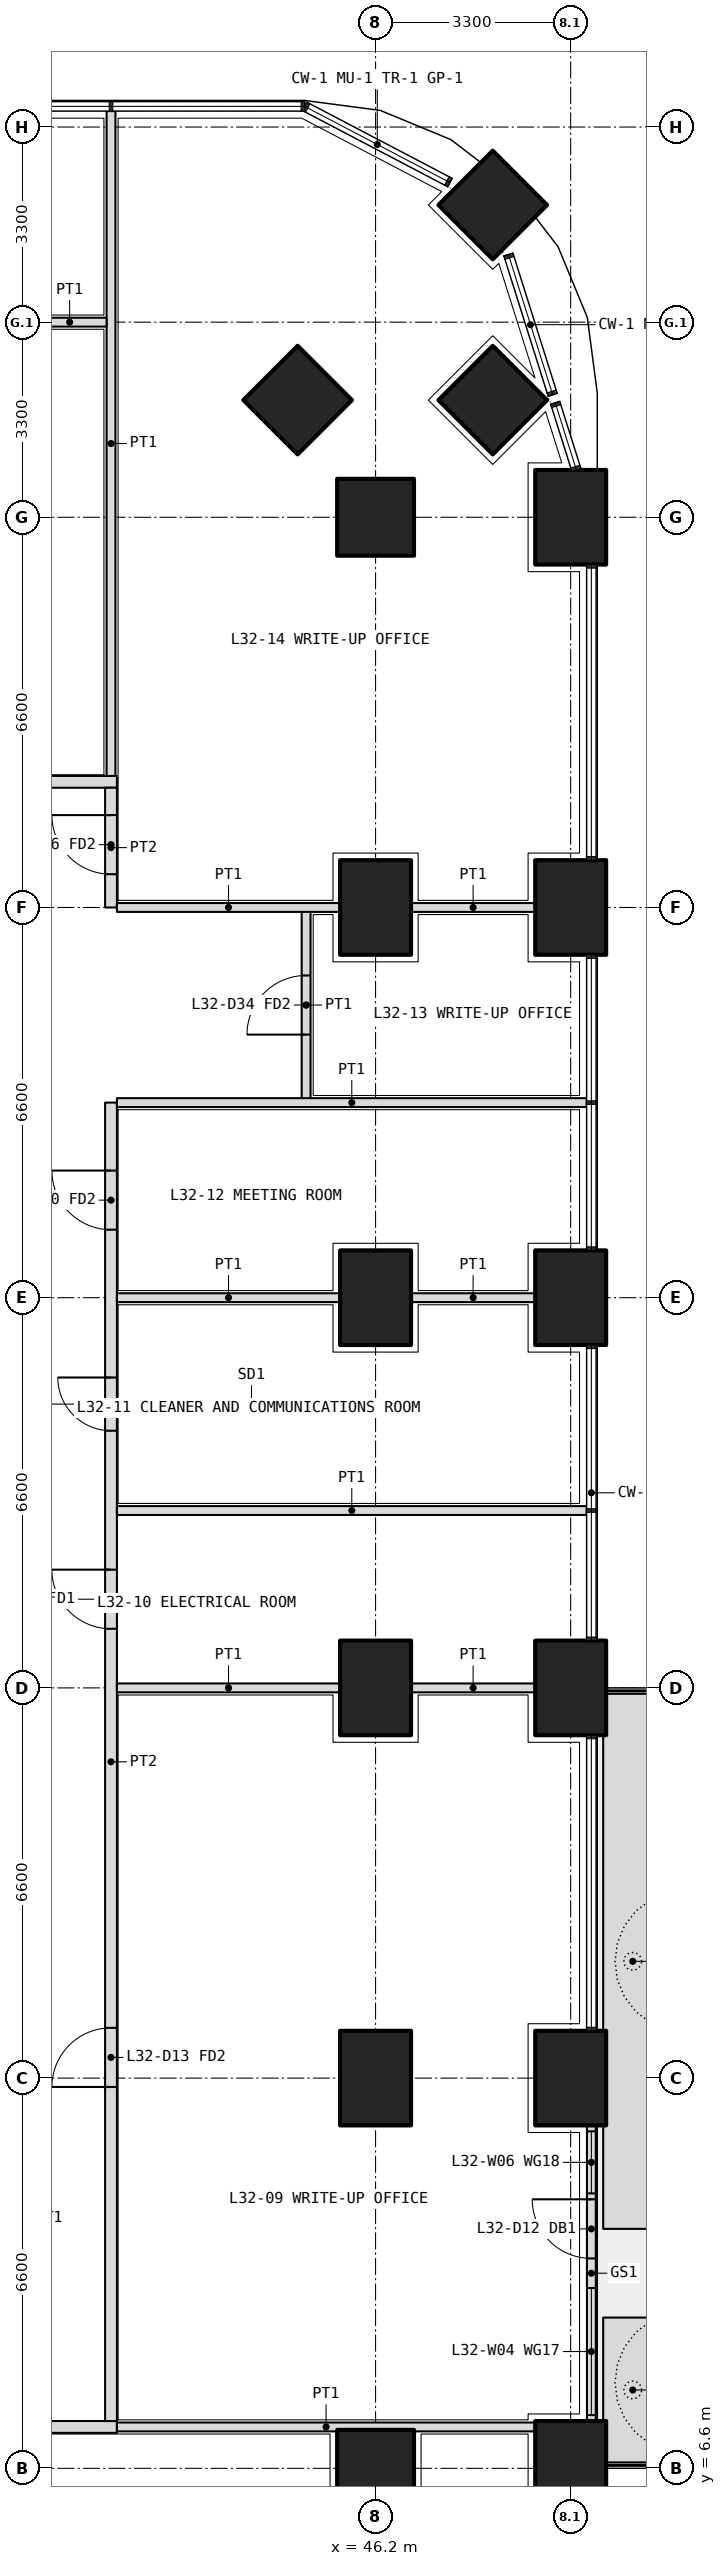
"""IFC4 building model, lengths in metres.
Left out: names, types, materials, properties, quantities, classifications, styles, units other than length and angle.
Written with IfcOpenShell. Run it as: python <this file> out.ifc"""

import sys

from ifc_helpers import new_model, si_unit, direction, frame, frame_2d, origin, origin_2d, place, context, subcontext, project, spatial, polyline, rectangle, outline, extrude, element, fill, save


model = new_model("IFC4")
c1 = context("Model", 3, precision=1e-05, world=origin(), true_north=direction((0.0, 1.0)))
c2 = subcontext(c1, "Body", "Model", "MODEL_VIEW")
j1 = project(units=[si_unit("LENGTHUNIT", "METRE"), si_unit("PLANEANGLEUNIT", "RADIAN")], contexts=[c1])
p1 = place(None, origin())
s1 = spatial("IfcSite", under=j1, at=p1, CompositionType="ELEMENT")
p2 = place(p1, origin())
s2 = spatial("IfcBuilding", under=s1, at=p2, CompositionType="ELEMENT")
p3 = place(p2, frame((0.0, 0.0, 141.0)))
s3 = spatial("IfcBuildingStorey", under=s2, at=p3, CompositionType="ELEMENT", Elevation=141.0)
p4 = place(p3, frame((48.182, 44.882, 0.0), z_axis=(0.0, 0.0, 1.0), x_axis=(0.707106781187, 0.707106781187, 0.0)))
e1 = element("IfcColumn", 1, at=p4, inside=s3, PredefinedType="COLUMN", context=c2, shape_type="SweptSolid", body=[
    extrude(rectangle(XDim=1.3, YDim=1.3, at=origin_2d()), origin(), (0.0, 0.0, 1.0), 4.2),
])
for number, where, z_axis, x_axis in (
    (2, (49.5, 6.6, 0.0), (0.0, 0.0, 1.0), (0.0, 1.0, 0.0)),
    (3, (49.5, 13.2, 0.0), (0.0, 0.0, 1.0), (0.0, 1.0, 0.0)),
    (4, (49.5, 19.8, 0.0), (0.0, 0.0, 1.0), (0.0, 1.0, 0.0)),
    (5, (49.5, 26.4, 0.0), (0.0, 0.0, 1.0), (0.0, 1.0, 0.0)),
    (6, (49.5, 33.0, 0.0), (0.0, 0.0, 1.0), (0.0, 1.0, 0.0)),
    (7, (49.5, 39.6, 0.0), (0.0, 0.0, 1.0), (0.0, 1.0, 0.0)),
):
    element("IfcColumn", number, at=place(p3, frame(where, z_axis=z_axis, x_axis=x_axis)), inside=s3, PredefinedType="COLUMN", context=c2, shape_type="SweptSolid", body=[
        extrude(rectangle(XDim=1.6, YDim=1.2, at=origin_2d()), origin(), (0.0, 0.0, 1.0), 4.2),
    ])
for number, where, z_axis, x_axis in (
    (8, (46.2, 6.6, 0.0), (0.0, 0.0, 1.0), (1.0, 0.0, 0.0)),
    (9, (46.2, 39.6, 0.0), (0.0, 0.0, 1.0), (1.0, 0.0, 0.0)),
    (10, (48.182, 41.582, 0.0), (0.0, 0.0, 1.0), (0.707, 0.707, 0.0)),
    (11, (44.882, 41.582, 0.0), (0.0, 0.0, 1.0), (0.707, 0.707, 0.0)),
):
    element("IfcColumn", number, at=place(p3, frame(where, z_axis=z_axis, x_axis=x_axis)), inside=s3, PredefinedType="COLUMN", context=c2, shape_type="SweptSolid", body=[
        extrude(rectangle(XDim=1.3, YDim=1.3, at=origin_2d()), origin(), (0.0, 0.0, 1.0), 4.2),
    ])
for number, where, z_axis, x_axis in (
    (12, (46.2, 13.2, 0.0), (0.0, 0.0, 1.0), (0.0, 1.0, 0.0)),
    (13, (46.2, 19.8, 0.0), (0.0, 0.0, 1.0), (0.0, 1.0, 0.0)),
    (14, (46.2, 26.4, 0.0), (0.0, 0.0, 1.0), (0.0, 1.0, 0.0)),
    (15, (46.2, 33.0, 0.0), (0.0, 0.0, 1.0), (0.0, 1.0, 0.0)),
):
    element("IfcColumn", number, at=place(p3, frame(where, z_axis=z_axis, x_axis=x_axis)), inside=s3, PredefinedType="COLUMN", context=c2, shape_type="SweptSolid", body=[
        extrude(rectangle(XDim=1.6, YDim=1.2, at=origin_2d()), origin(), (0.0, 0.0, 1.0), 4.2),
    ])
p5 = place(p3, origin())
e16 = element("IfcWall", 16, at=p5, inside=s3, PredefinedType="USERDEFINED", context=c2, shape_type="SweptSolid", body=[
    extrude(outline(polyline([(50.05, 6.7), (51.05, 6.7), (51.05, 9.15), (50.05, 9.15), (50.05, 6.7)]), holes=[polyline([(50.2, 6.85), (50.9, 6.85), (50.9, 9.0), (50.2, 9.0), (50.2, 6.85)])]), origin(), (0.0, 0.0, 1.0), 1.05),
])
p6 = place(p3, origin())
e17 = element("IfcWall", 17, at=p6, inside=s3, PredefinedType="USERDEFINED", context=c2, shape_type="SweptSolid", body=[
    extrude(outline(polyline([(50.05, 10.65), (51.05, 10.65), (51.05, 19.7), (50.05, 19.7), (50.05, 10.65)]), holes=[polyline([(50.2, 10.8), (50.9, 10.8), (50.9, 19.55), (50.2, 19.55), (50.2, 10.8)])]), origin(), (0.0, 0.0, 1.0), 1.05),
])
p7 = place(p3, frame((49.85, 7.4, 0.0), z_axis=(0.0, 0.0, 1.0), x_axis=(0.0, 1.0, 0.0)))
e18 = element("IfcWall", 18, at=p7, inside=s3, PredefinedType="SOLIDWALL", context=c2, shape_type="SweptSolid", body=[
    extrude(rectangle(XDim=5.0, YDim=0.15, at=frame_2d((2.5, 0.0))), origin(), (0.0, 0.0, 1.0), 2.6),
])
p8 = place(p7, frame((2.75, 0.0, 0.0)))
e19 = element("IfcOpeningElement", 19, at=p8, cuts=e18, PredefinedType="OPENING", context=c2, shape_type="SweptSolid", body=[
    extrude(rectangle(XDim=1.0, YDim=2.4, at=frame_2d((0.5, 1.2))), frame((0.0, 0.085, 0.0), z_axis=(0.0, -1.0, 0.0), x_axis=(1.0, 0.0, 0.0)), (0.0, 0.0, 1.0), 0.17),
])
p9 = place(p7, frame((0.1, 0.0, 0.1)))
e20 = element("IfcOpeningElement", 20, at=p9, cuts=e18, PredefinedType="OPENING", context=c2, shape_type="SweptSolid", body=[
    extrude(rectangle(XDim=2.15, YDim=2.2, at=frame_2d((1.075, 1.1))), frame((0.0, 0.085, 0.0), z_axis=(0.0, -1.0, 0.0), x_axis=(1.0, 0.0, 0.0)), (0.0, 0.0, 1.0), 0.17),
])
p10 = place(p7, frame((3.85, 0.0, 0.1)))
e21 = element("IfcOpeningElement", 21, at=p10, cuts=e18, PredefinedType="OPENING", context=c2, shape_type="SweptSolid", body=[
    extrude(rectangle(XDim=1.05, YDim=2.2, at=frame_2d((0.525, 1.1))), frame((0.0, 0.085, 0.0), z_axis=(0.0, -1.0, 0.0), x_axis=(1.0, 0.0, 0.0)), (0.0, 0.0, 1.0), 0.17),
])
p11 = place(p3, frame((10.975, 7.3, 0.0), z_axis=(0.0, 0.0, 1.0), x_axis=(1.0, 0.0, 0.0)))
e22 = element("IfcWall", 22, at=p11, inside=s3, PredefinedType="PARTITIONING", context=c2, shape_type="SweptSolid", body=[
    extrude(rectangle(XDim=30.85, YDim=0.2, at=frame_2d((15.425, 0.0))), origin(), (0.0, 0.0, 1.0), 2.85),
])
p12 = place(p11, frame((3.962, 0.0, 0.0)))
e23 = element("IfcOpeningElement", 23, at=p12, cuts=e22, PredefinedType="OPENING", context=c2, shape_type="SweptSolid", body=[
    extrude(rectangle(XDim=1.0, YDim=2.1, at=frame_2d((0.5, 1.05))), frame((0.0, 0.11, 0.0), z_axis=(0.0, -1.0, 0.0), x_axis=(1.0, 0.0, 0.0)), (0.0, 0.0, 1.0), 0.22),
])
p13 = place(p11, frame((13.275, 0.0, 0.0)))
e24 = element("IfcOpeningElement", 24, at=p13, cuts=e22, PredefinedType="OPENING", context=c2, shape_type="SweptSolid", body=[
    extrude(rectangle(XDim=1.0, YDim=2.1, at=frame_2d((0.5, 1.05))), frame((0.0, 0.11, 0.0), z_axis=(0.0, -1.0, 0.0), x_axis=(1.0, 0.0, 0.0)), (0.0, 0.0, 1.0), 0.22),
])
p14 = place(p11, frame((21.525, 0.0, 0.0)))
e25 = element("IfcOpeningElement", 25, at=p14, cuts=e22, PredefinedType="OPENING", context=c2, shape_type="SweptSolid", body=[
    extrude(rectangle(XDim=1.0, YDim=2.1, at=frame_2d((0.5, 1.05))), frame((0.0, 0.11, 0.0), z_axis=(0.0, -1.0, 0.0), x_axis=(1.0, 0.0, 0.0)), (0.0, 0.0, 1.0), 0.22),
])
p15 = place(p11, frame((27.438, 0.0, 0.0)))
e26 = element("IfcOpeningElement", 26, at=p15, cuts=e22, PredefinedType="OPENING", context=c2, shape_type="SweptSolid", body=[
    extrude(rectangle(XDim=1.2, YDim=2.1, at=frame_2d((0.6, 1.05))), frame((0.0, 0.11, 0.0), z_axis=(0.0, -1.0, 0.0), x_axis=(1.0, 0.0, 0.0)), (0.0, 0.0, 1.0), 0.22),
])
p16 = place(p3, frame((10.975, 35.125, 0.0), z_axis=(0.0, 0.0, 1.0), x_axis=(1.0, 0.0, 0.0)))
e27 = element("IfcWall", 27, at=p16, inside=s3, PredefinedType="PARTITIONING", context=c2, shape_type="SweptSolid", body=[
    extrude(rectangle(XDim=30.85, YDim=0.2, at=frame_2d((15.425, 0.0))), origin(), (0.0, 0.0, 1.0), 2.85),
])
p17 = place(p16, frame((2.312, 0.0, 0.0)))
e28 = element("IfcOpeningElement", 28, at=p17, cuts=e27, PredefinedType="OPENING", context=c2, shape_type="SweptSolid", body=[
    extrude(rectangle(XDim=1.0, YDim=2.1, at=frame_2d((0.5, 1.05))), frame((0.0, 0.11, 0.0), z_axis=(0.0, -1.0, 0.0), x_axis=(1.0, 0.0, 0.0)), (0.0, 0.0, 1.0), 0.22),
])
p18 = place(p16, frame((8.325, 0.0, 0.0)))
e29 = element("IfcOpeningElement", 29, at=p18, cuts=e27, PredefinedType="OPENING", context=c2, shape_type="SweptSolid", body=[
    extrude(rectangle(XDim=1.0, YDim=2.1, at=frame_2d((0.5, 1.05))), frame((0.0, 0.11, 0.0), z_axis=(0.0, -1.0, 0.0), x_axis=(1.0, 0.0, 0.0)), (0.0, 0.0, 1.0), 0.22),
])
p19 = place(p16, frame((13.725, 0.0, 0.0)))
e30 = element("IfcOpeningElement", 30, at=p19, cuts=e27, PredefinedType="OPENING", context=c2, shape_type="SweptSolid", body=[
    extrude(rectangle(XDim=1.0, YDim=2.1, at=frame_2d((0.5, 1.05))), frame((0.0, 0.11, 0.0), z_axis=(0.0, -1.0, 0.0), x_axis=(1.0, 0.0, 0.0)), (0.0, 0.0, 1.0), 0.22),
])
p20 = place(p16, frame((17.025, 0.0, 0.0)))
e31 = element("IfcOpeningElement", 31, at=p20, cuts=e27, PredefinedType="OPENING", context=c2, shape_type="SweptSolid", body=[
    extrude(rectangle(XDim=1.0, YDim=2.1, at=frame_2d((0.5, 1.05))), frame((0.0, 0.11, 0.0), z_axis=(0.0, -1.0, 0.0), x_axis=(1.0, 0.0, 0.0)), (0.0, 0.0, 1.0), 0.22),
])
p21 = place(p16, frame((24.238, 0.0, 0.0)))
e32 = element("IfcOpeningElement", 32, at=p21, cuts=e27, PredefinedType="OPENING", context=c2, shape_type="SweptSolid", body=[
    extrude(rectangle(XDim=1.0, YDim=2.1, at=frame_2d((0.5, 1.05))), frame((0.0, 0.11, 0.0), z_axis=(0.0, -1.0, 0.0), x_axis=(1.0, 0.0, 0.0)), (0.0, 0.0, 1.0), 0.22),
])
p22 = place(p3, frame((41.725, 7.4, 0.0), z_axis=(0.0, 0.0, 1.0), x_axis=(0.0, 1.0, 0.0)))
e33 = element("IfcWall", 33, at=p22, inside=s3, PredefinedType="PARTITIONING", context=c2, shape_type="SweptSolid", body=[
    extrude(rectangle(XDim=22.3, YDim=0.2, at=frame_2d((11.15, 0.0))), origin(), (0.0, 0.0, 1.0), 2.85),
])
p23 = place(p22, frame((5.65, 0.0, 0.0)))
e34 = element("IfcOpeningElement", 34, at=p23, cuts=e33, PredefinedType="OPENING", context=c2, shape_type="SweptSolid", body=[
    extrude(rectangle(XDim=1.0, YDim=2.1, at=frame_2d((0.5, 1.05))), frame((0.0, 0.11, 0.0), z_axis=(0.0, -1.0, 0.0), x_axis=(1.0, 0.0, 0.0)), (0.0, 0.0, 1.0), 0.22),
])
p24 = place(p22, frame((13.4, 0.0, 0.0)))
e35 = element("IfcOpeningElement", 35, at=p24, cuts=e33, PredefinedType="OPENING", context=c2, shape_type="SweptSolid", body=[
    extrude(rectangle(XDim=1.0, YDim=2.1, at=frame_2d((0.5, 1.05))), frame((0.0, 0.11, 0.0), z_axis=(0.0, -1.0, 0.0), x_axis=(1.0, 0.0, 0.0)), (0.0, 0.0, 1.0), 0.22),
])
p25 = place(p22, frame((16.75, 0.0, 0.0)))
e36 = element("IfcOpeningElement", 36, at=p25, cuts=e33, PredefinedType="OPENING", context=c2, shape_type="SweptSolid", body=[
    extrude(rectangle(XDim=0.9, YDim=2.1, at=frame_2d((0.45, 1.05))), frame((0.0, 0.11, 0.0), z_axis=(0.0, -1.0, 0.0), x_axis=(1.0, 0.0, 0.0)), (0.0, 0.0, 1.0), 0.22),
])
p26 = place(p22, frame((20.15, 0.0, 0.0)))
e37 = element("IfcOpeningElement", 37, at=p26, cuts=e33, PredefinedType="OPENING", context=c2, shape_type="SweptSolid", body=[
    extrude(rectangle(XDim=1.0, YDim=2.1, at=frame_2d((0.5, 1.05))), frame((0.0, 0.11, 0.0), z_axis=(0.0, -1.0, 0.0), x_axis=(1.0, 0.0, 0.0)), (0.0, 0.0, 1.0), 0.22),
])
p27 = place(p3, frame((41.725, 33.0, 0.0), z_axis=(0.0, 0.0, 1.0), x_axis=(0.0, 1.0, 0.0)))
e38 = element("IfcWall", 38, at=p27, inside=s3, PredefinedType="PARTITIONING", context=c2, shape_type="SweptSolid", body=[
    extrude(rectangle(XDim=2.025, YDim=0.2, at=frame_2d((1.012, 0.0))), origin(), (0.0, 0.0, 1.0), 2.85),
])
p28 = place(p27, frame((0.562, 0.0, 0.0)))
e39 = element("IfcOpeningElement", 39, at=p28, cuts=e38, PredefinedType="OPENING", context=c2, shape_type="SweptSolid", body=[
    extrude(rectangle(XDim=1.0, YDim=2.1, at=frame_2d((0.5, 1.05))), frame((0.0, 0.11, 0.0), z_axis=(0.0, -1.0, 0.0), x_axis=(1.0, 0.0, 0.0)), (0.0, 0.0, 1.0), 0.22),
])
p29 = place(p3, frame((48.9, 7.3, 0.0), z_axis=(0.0, 0.0, 1.0), x_axis=(-1.0, 0.0, 0.0)))
e40 = element("IfcWall", 40, at=p29, inside=s3, PredefinedType="PARTITIONING", context=c2, shape_type="SweptSolid", body=[
    extrude(rectangle(XDim=7.075, YDim=0.15, at=frame_2d((3.538, 0.0))), origin(), (0.0, 0.0, 1.0), 2.85),
])
p30 = place(p3, frame((41.725, 46.47, 0.0), z_axis=(0.0, 0.0, 1.0), x_axis=(0.0, -1.0, 0.0)))
e41 = element("IfcWall", 41, at=p30, inside=s3, PredefinedType="PARTITIONING", context=c2, shape_type="SweptSolid", body=[
    extrude(rectangle(XDim=11.245, YDim=0.15, at=frame_2d((5.623, 0.0))), origin(), (0.0, 0.0, 1.0), 2.6),
])
p31 = place(p3, frame((49.77, 22.8, 0.0), z_axis=(0.0, 0.0, 1.0), x_axis=(-1.0, 0.0, 0.0)))
e42 = element("IfcWall", 42, at=p31, inside=s3, PredefinedType="PARTITIONING", context=c2, shape_type="SweptSolid", body=[
    extrude(rectangle(XDim=7.945, YDim=0.15, at=frame_2d((3.973, 0.0))), origin(), (0.0, 0.0, 1.0), 2.6),
])
p32 = place(p3, frame((48.9, 26.4, 0.0), z_axis=(0.0, 0.0, 1.0), x_axis=(-1.0, 0.0, 0.0)))
e43 = element("IfcWall", 43, at=p32, inside=s3, PredefinedType="PARTITIONING", context=c2, shape_type="SweptSolid", body=[
    extrude(rectangle(XDim=2.1, YDim=0.15, at=frame_2d((1.05, 0.0))), origin(), (0.0, 0.0, 1.0), 2.85),
])
p33 = place(p3, frame((45.6, 26.4, 0.0), z_axis=(0.0, 0.0, 1.0), x_axis=(-1.0, 0.0, 0.0)))
e44 = element("IfcWall", 44, at=p33, inside=s3, PredefinedType="PARTITIONING", context=c2, shape_type="SweptSolid", body=[
    extrude(rectangle(XDim=3.775, YDim=0.15, at=frame_2d((1.888, 0.0))), origin(), (0.0, 0.0, 1.0), 2.85),
])
p34 = place(p3, frame((45.025, 29.7, 0.0), z_axis=(0.0, 0.0, 1.0), x_axis=(0.0, 1.0, 0.0)))
e45 = element("IfcWall", 45, at=p34, inside=s3, PredefinedType="PARTITIONING", context=c2, shape_type="SweptSolid", body=[
    extrude(rectangle(XDim=3.3, YDim=0.15, at=frame_2d((1.65, 0.0))), origin(), (0.0, 0.0, 1.0), 2.85),
])
p35 = place(p34, frame((1.15, 0.0, 0.0)))
e46 = element("IfcOpeningElement", 46, at=p35, cuts=e45, PredefinedType="OPENING", context=c2, shape_type="SweptSolid", body=[
    extrude(rectangle(XDim=1.0, YDim=2.1, at=frame_2d((0.5, 1.05))), frame((0.0, 0.085, 0.0), z_axis=(0.0, -1.0, 0.0), x_axis=(1.0, 0.0, 0.0)), (0.0, 0.0, 1.0), 0.17),
])
p36 = place(p3, frame((48.9, 19.8, 0.0), z_axis=(0.0, 0.0, 1.0), x_axis=(-1.0, 0.0, 0.0)))
e47 = element("IfcWall", 47, at=p36, inside=s3, PredefinedType="PARTITIONING", context=c2, shape_type="SweptSolid", body=[
    extrude(rectangle(XDim=2.1, YDim=0.15, at=frame_2d((1.05, 0.0))), origin(), (0.0, 0.0, 1.0), 2.85),
])
p37 = place(p3, frame((45.6, 19.8, 0.0), z_axis=(0.0, 0.0, 1.0), x_axis=(-1.0, 0.0, 0.0)))
e48 = element("IfcWall", 48, at=p37, inside=s3, PredefinedType="PARTITIONING", context=c2, shape_type="SweptSolid", body=[
    extrude(rectangle(XDim=3.775, YDim=0.15, at=frame_2d((1.888, 0.0))), origin(), (0.0, 0.0, 1.0), 2.85),
])
p38 = place(p3, frame((49.77, 29.7, 0.0), z_axis=(0.0, 0.0, 1.0), x_axis=(-1.0, 0.0, 0.0)))
e49 = element("IfcWall", 49, at=p38, inside=s3, PredefinedType="PARTITIONING", context=c2, shape_type="SweptSolid", body=[
    extrude(rectangle(XDim=7.945, YDim=0.15, at=frame_2d((3.973, 0.0))), origin(), (0.0, 0.0, 1.0), 2.6),
])
p39 = place(p3, frame((48.9, 33.0, 0.0), z_axis=(0.0, 0.0, 1.0), x_axis=(-1.0, 0.0, 0.0)))
e50 = element("IfcWall", 50, at=p39, inside=s3, PredefinedType="PARTITIONING", context=c2, shape_type="SweptSolid", body=[
    extrude(rectangle(XDim=2.1, YDim=0.15, at=frame_2d((1.05, 0.0))), origin(), (0.0, 0.0, 1.0), 2.85),
])
p40 = place(p3, frame((45.6, 33.0, 0.0), z_axis=(0.0, 0.0, 1.0), x_axis=(-1.0, 0.0, 0.0)))
e51 = element("IfcWall", 51, at=p40, inside=s3, PredefinedType="PARTITIONING", context=c2, shape_type="SweptSolid", body=[
    extrude(rectangle(XDim=3.775, YDim=0.15, at=frame_2d((1.888, 0.0))), origin(), (0.0, 0.0, 1.0), 2.85),
])
p41 = place(p3, frame((41.65, 42.9, 0.0), z_axis=(0.0, 0.0, 1.0), x_axis=(-1.0, 0.0, 0.0)))
e52 = element("IfcWall", 52, at=p41, inside=s3, PredefinedType="PARTITIONING", context=c2, shape_type="SweptSolid", body=[
    extrude(rectangle(XDim=1.25, YDim=0.15, at=frame_2d((0.625, 0.0))), origin(), (0.0, 0.0, 1.0), 2.85),
])
p42 = place(p8, origin())
e53 = element("IfcDoor", 53, at=p42, inside=s3, OperationType="SINGLE_SWING_RIGHT", PredefinedType="DOOR", context=c2, shape_type="SweptSolid", body=[
    extrude(rectangle(XDim=1.0, YDim=2.4, at=frame_2d((0.5, 1.2))), frame((0.0, 0.025, 0.0), z_axis=(0.0, -1.0, 0.0), x_axis=(1.0, 0.0, 0.0)), (0.0, 0.0, 1.0), 0.05),
])
fill(e19, e53)
p43 = place(p9, origin())
e54 = element("IfcWindow", 54, at=p43, inside=s3, PartitioningType="SINGLE_PANEL", PredefinedType="WINDOW", context=c2, shape_type="SweptSolid", body=[
    extrude(rectangle(XDim=2.15, YDim=2.2, at=frame_2d((1.075, 1.1))), frame((0.0, 0.03, 0.0), z_axis=(0.0, -1.0, 0.0), x_axis=(1.0, 0.0, 0.0)), (0.0, 0.0, 1.0), 0.06),
])
fill(e20, e54)
p44 = place(p10, origin())
e55 = element("IfcWindow", 55, at=p44, inside=s3, PartitioningType="SINGLE_PANEL", PredefinedType="WINDOW", context=c2, shape_type="SweptSolid", body=[
    extrude(rectangle(XDim=1.05, YDim=2.2, at=frame_2d((0.525, 1.1))), frame((0.0, 0.03, 0.0), z_axis=(0.0, -1.0, 0.0), x_axis=(1.0, 0.0, 0.0)), (0.0, 0.0, 1.0), 0.06),
])
fill(e21, e55)
p45 = place(p23, origin())
e56 = element("IfcDoor", 56, at=p45, inside=s3, OperationType="SINGLE_SWING_LEFT", PredefinedType="DOOR", context=c2, shape_type="SweptSolid", body=[
    extrude(rectangle(XDim=1.0, YDim=2.1, at=frame_2d((0.5, 1.05))), frame((0.0, 0.025, 0.0), z_axis=(0.0, -1.0, 0.0), x_axis=(1.0, 0.0, 0.0)), (0.0, 0.0, 1.0), 0.05),
])
fill(e34, e56)
p46 = place(p24, origin())
e57 = element("IfcDoor", 57, at=p46, inside=s3, OperationType="SINGLE_SWING_RIGHT", PredefinedType="DOOR", context=c2, shape_type="SweptSolid", body=[
    extrude(rectangle(XDim=1.0, YDim=2.1, at=frame_2d((0.5, 1.05))), frame((0.0, 0.025, 0.0), z_axis=(0.0, -1.0, 0.0), x_axis=(1.0, 0.0, 0.0)), (0.0, 0.0, 1.0), 0.05),
])
fill(e35, e57)
p47 = place(p25, origin())
e58 = element("IfcDoor", 58, at=p47, inside=s3, OperationType="SINGLE_SWING_RIGHT", PredefinedType="DOOR", context=c2, shape_type="SweptSolid", body=[
    extrude(rectangle(XDim=0.9, YDim=2.1, at=frame_2d((0.45, 1.05))), frame((0.0, 0.025, 0.0), z_axis=(0.0, -1.0, 0.0), x_axis=(1.0, 0.0, 0.0)), (0.0, 0.0, 1.0), 0.05),
])
fill(e36, e58)
p48 = place(p26, origin())
e59 = element("IfcDoor", 59, at=p48, inside=s3, OperationType="SINGLE_SWING_RIGHT", PredefinedType="DOOR", context=c2, shape_type="SweptSolid", body=[
    extrude(rectangle(XDim=1.0, YDim=2.1, at=frame_2d((0.5, 1.05))), frame((0.0, 0.025, 0.0), z_axis=(0.0, -1.0, 0.0), x_axis=(1.0, 0.0, 0.0)), (0.0, 0.0, 1.0), 0.05),
])
fill(e37, e59)
p49 = place(p35, origin())
e60 = element("IfcDoor", 60, at=p49, inside=s3, OperationType="SINGLE_SWING_LEFT", PredefinedType="DOOR", context=c2, shape_type="SweptSolid", body=[
    extrude(rectangle(XDim=1.0, YDim=2.1, at=frame_2d((0.5, 1.05))), frame((0.0, 0.025, 0.0), z_axis=(0.0, -1.0, 0.0), x_axis=(1.0, 0.0, 0.0)), (0.0, 0.0, 1.0), 0.05),
])
fill(e46, e60)
p50 = place(p28, origin())
e61 = element("IfcDoor", 61, at=p50, inside=s3, OperationType="SINGLE_SWING_RIGHT", PredefinedType="DOOR", context=c2, shape_type="SweptSolid", body=[
    extrude(rectangle(XDim=1.0, YDim=2.1, at=frame_2d((0.5, 1.05))), frame((0.0, 0.025, 0.0), z_axis=(0.0, -1.0, 0.0), x_axis=(1.0, 0.0, 0.0)), (0.0, 0.0, 1.0), 0.05),
])
fill(e39, e61)
save(model, sys.argv[1])
